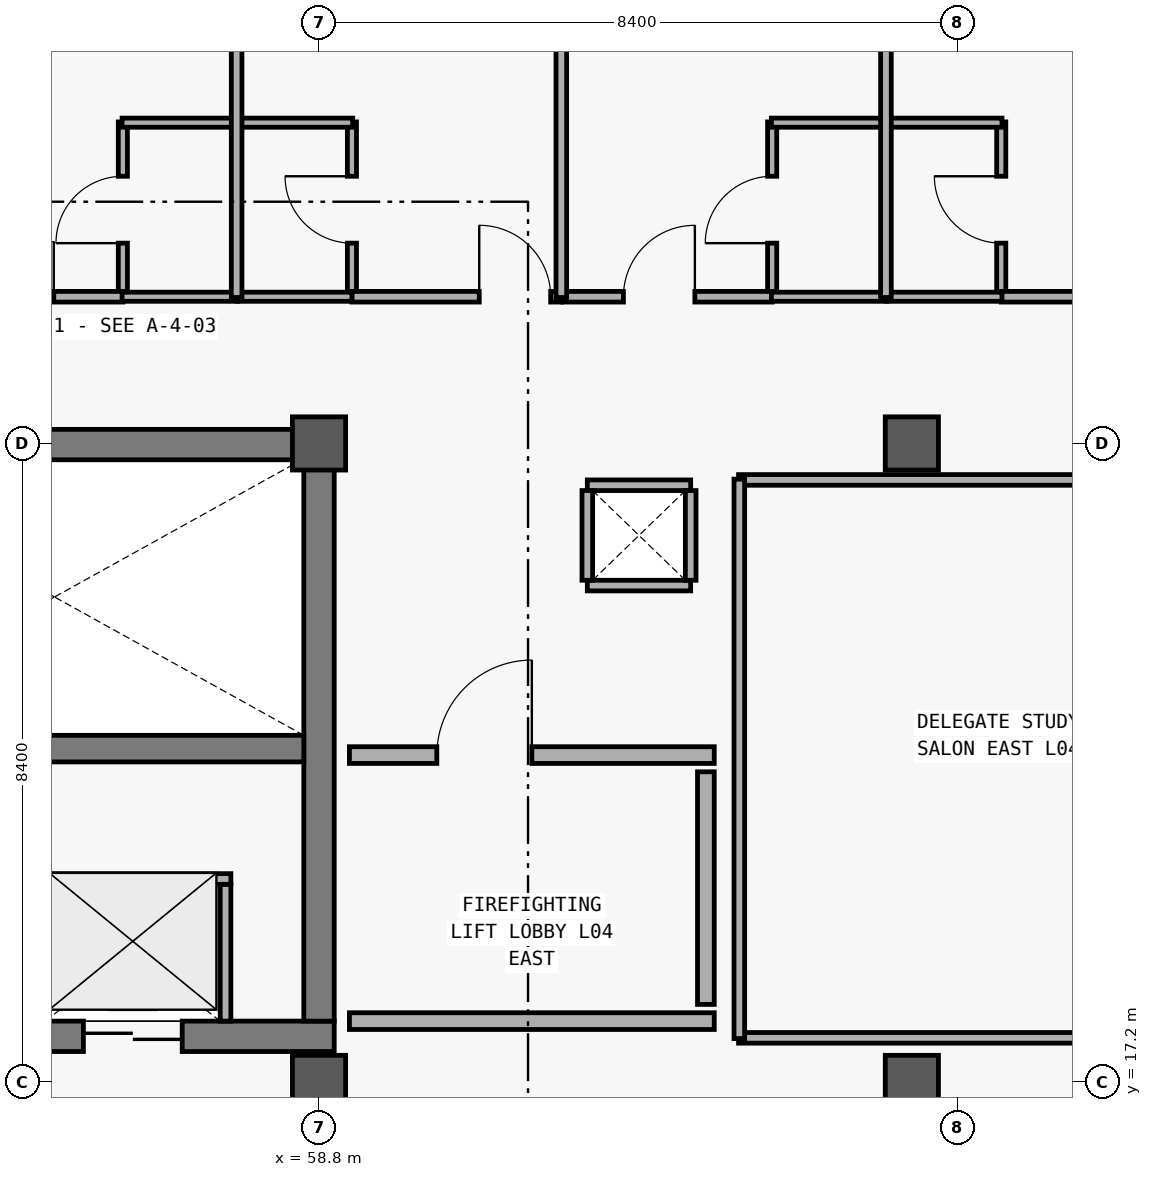
"""IFC4 building model, lengths in metres.
Left out: names, types, materials, properties, quantities, classifications, styles, units other than length and angle.
Written with IfcOpenShell. Run it as: python <this file> out.ifc"""

import sys

from ifc_helpers import new_model, si_unit, direction, frame, frame_2d, origin, origin_2d, place, context, subcontext, project, spatial, rectangle, extrude, element, fill, save


model = new_model("IFC4")
c1 = context("Model", 3, precision=1e-05, world=origin(), true_north=direction((0.0, 1.0)))
c2 = subcontext(c1, "Body", "Model", "MODEL_VIEW")
j1 = project(units=[si_unit("LENGTHUNIT", "METRE"), si_unit("PLANEANGLEUNIT", "RADIAN")], contexts=[c1])
p1 = place(None, origin())
s1 = spatial("IfcSite", under=j1, at=p1, CompositionType="ELEMENT")
p2 = place(p1, origin())
s2 = spatial("IfcBuilding", under=s1, at=p2, CompositionType="ELEMENT")
p3 = place(p2, frame((0.0, 0.0, 19.2)))
s3 = spatial("IfcBuildingStorey", under=s2, at=p3, CompositionType="ELEMENT", Elevation=19.2)
for number, where, z_axis, x_axis in (
    (1, (58.8, 17.2, 0.0), (0.0, 0.0, 1.0), (1.0, 0.0, 0.0)),
    (2, (58.8, 25.6, 0.0), (0.0, 0.0, 1.0), (1.0, 0.0, 0.0)),
    (3, (66.6, 17.2, 0.0), (0.0, 0.0, 1.0), (1.0, 0.0, 0.0)),
    (4, (66.6, 25.6, 0.0), (0.0, 0.0, 1.0), (1.0, 0.0, 0.0)),
):
    element("IfcColumn", number, at=place(p3, frame(where, z_axis=z_axis, x_axis=x_axis)), inside=s3, PredefinedType="COLUMN", context=c2, shape_type="SweptSolid", body=[
        extrude(rectangle(XDim=0.7, YDim=0.7, at=origin_2d()), origin(), (0.0, 0.0, 1.0), 3.6),
    ])
p4 = place(p3, frame((49.8, 17.8, 0.0), z_axis=(0.0, 0.0, 1.0), x_axis=(1.0, 0.0, 0.0)))
e5 = element("IfcWall", 5, at=p4, inside=s3, PredefinedType="SHEAR", context=c2, shape_type="SweptSolid", body=[
    extrude(rectangle(XDim=9.2, YDim=0.4, at=frame_2d((4.6, 0.0))), origin(), (0.0, 0.0, 1.0), 3.32),
])
p5 = place(p4, frame((1.1, 0.0, 0.0)))
e6 = element("IfcOpeningElement", 6, at=p5, cuts=e5, PredefinedType="OPENING", context=c2, shape_type="SweptSolid", body=[
    extrude(rectangle(XDim=1.2, YDim=2.2, at=frame_2d((0.6, 1.1))), frame((0.0, 0.21, 0.0), z_axis=(0.0, -1.0, 0.0), x_axis=(1.0, 0.0, 0.0)), (0.0, 0.0, 1.0), 0.42),
])
p6 = place(p4, frame((3.5, 0.0, 0.0)))
e7 = element("IfcOpeningElement", 7, at=p6, cuts=e5, PredefinedType="OPENING", context=c2, shape_type="SweptSolid", body=[
    extrude(rectangle(XDim=1.1, YDim=2.2, at=frame_2d((0.55, 1.1))), frame((0.0, 0.21, 0.0), z_axis=(0.0, -1.0, 0.0), x_axis=(1.0, 0.0, 0.0)), (0.0, 0.0, 1.0), 0.42),
])
p7 = place(p4, frame((5.9, 0.0, 0.0)))
e8 = element("IfcOpeningElement", 8, at=p7, cuts=e5, PredefinedType="OPENING", context=c2, shape_type="SweptSolid", body=[
    extrude(rectangle(XDim=1.3, YDim=2.3, at=frame_2d((0.65, 1.15))), frame((0.0, 0.21, 0.0), z_axis=(0.0, -1.0, 0.0), x_axis=(1.0, 0.0, 0.0)), (0.0, 0.0, 1.0), 0.42),
])
p8 = place(p3, frame((59.0, 25.585, 0.0), z_axis=(0.0, 0.0, 1.0), x_axis=(-1.0, 0.0, 0.0)))
e9 = element("IfcWall", 9, at=p8, inside=s3, PredefinedType="SHEAR", context=c2, shape_type="SweptSolid", body=[
    extrude(rectangle(XDim=9.2, YDim=0.4, at=frame_2d((4.6, 0.0))), origin(), (0.0, 0.0, 1.0), 3.32),
])
p9 = place(p3, frame((58.8, 18.0, 0.0), z_axis=(0.0, 0.0, 1.0), x_axis=(0.0, 1.0, 0.0)))
e10 = element("IfcWall", 10, at=p9, inside=s3, PredefinedType="SHEAR", context=c2, shape_type="SweptSolid", body=[
    extrude(rectangle(XDim=7.4, YDim=0.4, at=frame_2d((3.7, 0.0))), origin(), (0.0, 0.0, 1.0), 3.32),
])
p10 = place(p3, frame((50.2, 21.585, 0.0), z_axis=(0.0, 0.0, 1.0), x_axis=(1.0, 0.0, 0.0)))
e11 = element("IfcWall", 11, at=p10, inside=s3, PredefinedType="SHEAR", context=c2, shape_type="SweptSolid", body=[
    extrude(rectangle(XDim=8.4, YDim=0.35, at=frame_2d((4.2, 0.0))), origin(), (0.0, 0.0, 1.0), 3.32),
])
p11 = place(p3, frame((57.57, 18.0, 0.0), z_axis=(0.0, 0.0, 1.0), x_axis=(0.0, 1.0, 0.0)))
e12 = element("IfcWall", 12, at=p11, inside=s3, PredefinedType="PARTITIONING", context=c2, shape_type="SweptSolid", body=[
    extrude(rectangle(XDim=1.8, YDim=0.14, at=frame_2d((0.9, 0.0))), origin(), (0.0, 0.0, 1.0), 2.47),
])
p12 = place(p3, frame((50.26, 19.87, 0.0), z_axis=(0.0, 0.0, 1.0), x_axis=(1.0, 0.0, 0.0)))
e13 = element("IfcWall", 13, at=p12, inside=s3, PredefinedType="PARTITIONING", context=c2, shape_type="SweptSolid", body=[
    extrude(rectangle(XDim=7.38, YDim=0.14, at=frame_2d((3.69, 0.0))), origin(), (0.0, 0.0, 1.0), 2.47),
])
p13 = place(p3, frame((59.2, 18.0, 0.0), z_axis=(0.0, 0.0, 1.0), x_axis=(1.0, 0.0, 0.0)))
e14 = element("IfcWall", 14, at=p13, inside=s3, PredefinedType="SOLIDWALL", context=c2, shape_type="SweptSolid", body=[
    extrude(rectangle(XDim=4.8, YDim=0.22, at=frame_2d((2.4, 0.0))), origin(), (0.0, 0.0, 1.0), 2.47),
])
p14 = place(p3, frame((59.2, 21.5, 0.0), z_axis=(0.0, 0.0, 1.0), x_axis=(1.0, 0.0, 0.0)))
e15 = element("IfcWall", 15, at=p14, inside=s3, PredefinedType="SOLIDWALL", context=c2, shape_type="SweptSolid", body=[
    extrude(rectangle(XDim=4.8, YDim=0.22, at=frame_2d((2.4, 0.0))), origin(), (0.0, 0.0, 1.0), 2.47),
])
p15 = place(p14, frame((1.15, 0.0, 0.0)))
e16 = element("IfcOpeningElement", 16, at=p15, cuts=e15, PredefinedType="OPENING", context=c2, shape_type="SweptSolid", body=[
    extrude(rectangle(XDim=1.25, YDim=2.2, at=frame_2d((0.625, 1.1))), frame((0.0, 0.12, 0.0), z_axis=(0.0, -1.0, 0.0), x_axis=(1.0, 0.0, 0.0)), (0.0, 0.0, 1.0), 0.24),
])
p16 = place(p3, frame((63.89, 18.22, 0.0), z_axis=(0.0, 0.0, 1.0), x_axis=(0.0, 1.0, 0.0)))
e17 = element("IfcWall", 17, at=p16, inside=s3, PredefinedType="SOLIDWALL", context=c2, shape_type="SweptSolid", body=[
    extrude(rectangle(XDim=3.06, YDim=0.22, at=frame_2d((1.53, 0.0))), origin(), (0.0, 0.0, 1.0), 2.47),
])
p17 = place(p3, frame((56.219, 27.52, 0.0), z_axis=(0.0, 0.0, 1.0), x_axis=(0.0, 1.0, 0.0)))
e18 = element("IfcWall", 18, at=p17, inside=s3, PredefinedType="PARTITIONING", context=c2, shape_type="SweptSolid", body=[
    extrude(rectangle(XDim=2.31, YDim=0.12, at=frame_2d((1.155, 0.0))), origin(), (0.0, 0.0, 1.0), 2.48),
])
p18 = place(p17, frame((0.715, 0.0, 0.0)))
e19 = element("IfcOpeningElement", 19, at=p18, cuts=e18, PredefinedType="OPENING", context=c2, shape_type="SweptSolid", body=[
    extrude(rectangle(XDim=0.88, YDim=2.15, at=frame_2d((0.44, 1.075))), frame((0.0, 0.07, 0.0), z_axis=(0.0, -1.0, 0.0), x_axis=(1.0, 0.0, 0.0)), (0.0, 0.0, 1.0), 0.14),
])
p19 = place(p3, frame((59.233, 27.52, 0.0), z_axis=(0.0, 0.0, 1.0), x_axis=(0.0, 1.0, 0.0)))
e20 = element("IfcWall", 20, at=p19, inside=s3, PredefinedType="PARTITIONING", context=c2, shape_type="SweptSolid", body=[
    extrude(rectangle(XDim=2.31, YDim=0.12, at=frame_2d((1.155, 0.0))), origin(), (0.0, 0.0, 1.0), 2.48),
])
p20 = place(p19, frame((0.715, 0.0, 0.0)))
e21 = element("IfcOpeningElement", 21, at=p20, cuts=e20, PredefinedType="OPENING", context=c2, shape_type="SweptSolid", body=[
    extrude(rectangle(XDim=0.88, YDim=2.15, at=frame_2d((0.44, 1.075))), frame((0.0, 0.07, 0.0), z_axis=(0.0, -1.0, 0.0), x_axis=(1.0, 0.0, 0.0)), (0.0, 0.0, 1.0), 0.14),
])
p21 = place(p3, frame((64.762, 27.52, 0.0), z_axis=(0.0, 0.0, 1.0), x_axis=(0.0, 1.0, 0.0)))
e22 = element("IfcWall", 22, at=p21, inside=s3, PredefinedType="PARTITIONING", context=c2, shape_type="SweptSolid", body=[
    extrude(rectangle(XDim=2.31, YDim=0.12, at=frame_2d((1.155, 0.0))), origin(), (0.0, 0.0, 1.0), 2.48),
])
p22 = place(p21, frame((0.715, 0.0, 0.0)))
e23 = element("IfcOpeningElement", 23, at=p22, cuts=e22, PredefinedType="OPENING", context=c2, shape_type="SweptSolid", body=[
    extrude(rectangle(XDim=0.88, YDim=2.15, at=frame_2d((0.44, 1.075))), frame((0.0, 0.07, 0.0), z_axis=(0.0, -1.0, 0.0), x_axis=(1.0, 0.0, 0.0)), (0.0, 0.0, 1.0), 0.14),
])
p23 = place(p3, frame((67.776, 27.52, 0.0), z_axis=(0.0, 0.0, 1.0), x_axis=(0.0, 1.0, 0.0)))
e24 = element("IfcWall", 24, at=p23, inside=s3, PredefinedType="PARTITIONING", context=c2, shape_type="SweptSolid", body=[
    extrude(rectangle(XDim=2.31, YDim=0.12, at=frame_2d((1.155, 0.0))), origin(), (0.0, 0.0, 1.0), 2.48),
])
p24 = place(p23, frame((0.715, 0.0, 0.0)))
e25 = element("IfcOpeningElement", 25, at=p24, cuts=e24, PredefinedType="OPENING", context=c2, shape_type="SweptSolid", body=[
    extrude(rectangle(XDim=0.88, YDim=2.15, at=frame_2d((0.44, 1.075))), frame((0.0, 0.07, 0.0), z_axis=(0.0, -1.0, 0.0), x_axis=(1.0, 0.0, 0.0)), (0.0, 0.0, 1.0), 0.14),
])
p25 = place(p3, frame((64.32, 17.78, 0.0), z_axis=(0.0, 0.0, 1.0), x_axis=(1.0, 0.0, 0.0)))
e26 = element("IfcWall", 26, at=p25, inside=s3, PredefinedType="PARTITIONING", context=c2, shape_type="SweptSolid", body=[
    extrude(rectangle(XDim=27.8, YDim=0.14, at=frame_2d((13.9, 0.0))), origin(), (0.0, 0.0, 1.0), 2.48),
])
p26 = place(p25, frame((5.958, 0.0, 0.0)))
e27 = element("IfcOpeningElement", 27, at=p26, cuts=e26, PredefinedType="OPENING", context=c2, shape_type="SweptSolid", body=[
    extrude(rectangle(XDim=1.08, YDim=2.25, at=frame_2d((0.54, 1.125))), frame((0.0, 0.08, 0.0), z_axis=(0.0, -1.0, 0.0), x_axis=(1.0, 0.0, 0.0)), (0.0, 0.0, 1.0), 0.16),
])
p27 = place(p3, frame((53.464, 27.53, 0.0), z_axis=(0.0, 0.0, 1.0), x_axis=(1.0, 0.0, 0.0)))
e28 = element("IfcWall", 28, at=p27, inside=s3, PredefinedType="PARTITIONING", context=c2, shape_type="SweptSolid", body=[
    extrude(rectangle(XDim=2.755, YDim=0.14, at=frame_2d((1.377, 0.0))), origin(), (0.0, 0.0, 1.0), 2.48),
])
p28 = place(p27, frame((0.396, 0.0, 0.0)))
e29 = element("IfcOpeningElement", 29, at=p28, cuts=e28, PredefinedType="OPENING", context=c2, shape_type="SweptSolid", body=[
    extrude(rectangle(XDim=1.45, YDim=2.3, at=frame_2d((0.725, 1.15))), frame((0.0, 0.08, 0.0), z_axis=(0.0, -1.0, 0.0), x_axis=(1.0, 0.0, 0.0)), (0.0, 0.0, 1.0), 0.16),
])
p29 = place(p3, frame((59.233, 27.53, 0.0), z_axis=(0.0, 0.0, 1.0), x_axis=(1.0, 0.0, 0.0)))
e30 = element("IfcWall", 30, at=p29, inside=s3, PredefinedType="PARTITIONING", context=c2, shape_type="SweptSolid", body=[
    extrude(rectangle(XDim=2.755, YDim=0.14, at=frame_2d((1.377, 0.0))), origin(), (0.0, 0.0, 1.0), 2.48),
])
p30 = place(p29, frame((1.675, 0.0, 0.0)))
e31 = element("IfcOpeningElement", 31, at=p30, cuts=e30, PredefinedType="OPENING", context=c2, shape_type="SweptSolid", body=[
    extrude(rectangle(XDim=0.94, YDim=2.2, at=frame_2d((0.47, 1.1))), frame((0.0, 0.08, 0.0), z_axis=(0.0, -1.0, 0.0), x_axis=(1.0, 0.0, 0.0)), (0.0, 0.0, 1.0), 0.16),
])
p31 = place(p3, frame((62.008, 27.53, 0.0), z_axis=(0.0, 0.0, 1.0), x_axis=(1.0, 0.0, 0.0)))
e32 = element("IfcWall", 32, at=p31, inside=s3, PredefinedType="PARTITIONING", context=c2, shape_type="SweptSolid", body=[
    extrude(rectangle(XDim=2.754, YDim=0.14, at=frame_2d((1.377, 0.0))), origin(), (0.0, 0.0, 1.0), 2.48),
])
p32 = place(p31, frame((0.797, 0.0, 0.0)))
e33 = element("IfcOpeningElement", 33, at=p32, cuts=e32, PredefinedType="OPENING", context=c2, shape_type="SweptSolid", body=[
    extrude(rectangle(XDim=0.94, YDim=2.2, at=frame_2d((0.47, 1.1))), frame((0.0, 0.08, 0.0), z_axis=(0.0, -1.0, 0.0), x_axis=(1.0, 0.0, 0.0)), (0.0, 0.0, 1.0), 0.16),
])
p33 = place(p3, frame((67.776, 27.53, 0.0), z_axis=(0.0, 0.0, 1.0), x_axis=(1.0, 0.0, 0.0)))
e34 = element("IfcWall", 34, at=p33, inside=s3, PredefinedType="PARTITIONING", context=c2, shape_type="SweptSolid", body=[
    extrude(rectangle(XDim=2.755, YDim=0.14, at=frame_2d((1.377, 0.0))), origin(), (0.0, 0.0, 1.0), 2.48),
])
p34 = place(p33, frame((1.675, 0.0, 0.0)))
e35 = element("IfcOpeningElement", 35, at=p34, cuts=e34, PredefinedType="OPENING", context=c2, shape_type="SweptSolid", body=[
    extrude(rectangle(XDim=0.94, YDim=2.2, at=frame_2d((0.47, 1.1))), frame((0.0, 0.08, 0.0), z_axis=(0.0, -1.0, 0.0), x_axis=(1.0, 0.0, 0.0)), (0.0, 0.0, 1.0), 0.16),
])
for number, where, z_axis, x_axis in (
    (36, (56.209, 27.53, 0.0), (0.0, 0.0, 1.0), (1.0, 0.0, 0.0)),
    (37, (56.209, 29.82, 0.0), (0.0, 0.0, 1.0), (1.0, 0.0, 0.0)),
):
    element("IfcWall", number, at=place(p3, frame(where, z_axis=z_axis, x_axis=x_axis)), inside=s3, PredefinedType="PARTITIONING", context=c2, shape_type="SweptSolid", body=[
        extrude(rectangle(XDim=1.517, YDim=0.12, at=frame_2d((0.759, 0.0))), origin(), (0.0, 0.0, 1.0), 2.48),
    ])
p35 = place(p3, frame((57.726, 27.53, 0.0), z_axis=(0.0, 0.0, 1.0), x_axis=(1.0, 0.0, 0.0)))
e38 = element("IfcWall", 38, at=p35, inside=s3, PredefinedType="PARTITIONING", context=c2, shape_type="SweptSolid", body=[
    extrude(rectangle(XDim=1.507, YDim=0.12, at=frame_2d((0.753, 0.0))), origin(), (0.0, 0.0, 1.0), 2.48),
])
p36 = place(p3, frame((57.726, 29.82, 0.0), z_axis=(0.0, 0.0, 1.0), x_axis=(1.0, 0.0, 0.0)))
e39 = element("IfcWall", 39, at=p36, inside=s3, PredefinedType="PARTITIONING", context=c2, shape_type="SweptSolid", body=[
    extrude(rectangle(XDim=1.517, YDim=0.12, at=frame_2d((0.758, 0.0))), origin(), (0.0, 0.0, 1.0), 2.48),
])
for number, where, z_axis, x_axis in (
    (40, (64.752, 27.53, 0.0), (0.0, 0.0, 1.0), (1.0, 0.0, 0.0)),
    (41, (64.752, 29.82, 0.0), (0.0, 0.0, 1.0), (1.0, 0.0, 0.0)),
):
    element("IfcWall", number, at=place(p3, frame(where, z_axis=z_axis, x_axis=x_axis)), inside=s3, PredefinedType="PARTITIONING", context=c2, shape_type="SweptSolid", body=[
        extrude(rectangle(XDim=1.517, YDim=0.12, at=frame_2d((0.759, 0.0))), origin(), (0.0, 0.0, 1.0), 2.48),
    ])
for number, where, z_axis, x_axis in (
    (42, (66.269, 27.53, 0.0), (0.0, 0.0, 1.0), (1.0, 0.0, 0.0)),
    (43, (66.269, 29.82, 0.0), (0.0, 0.0, 1.0), (1.0, 0.0, 0.0)),
):
    element("IfcWall", number, at=place(p3, frame(where, z_axis=z_axis, x_axis=x_axis)), inside=s3, PredefinedType="PARTITIONING", context=c2, shape_type="SweptSolid", body=[
        extrude(rectangle(XDim=1.517, YDim=0.12, at=frame_2d((0.758, 0.0))), origin(), (0.0, 0.0, 1.0), 2.48),
    ])
p37 = place(p3, frame((64.32, 25.12, 0.0), z_axis=(0.0, 0.0, 1.0), x_axis=(1.0, 0.0, 0.0)))
e44 = element("IfcWall", 44, at=p37, inside=s3, PredefinedType="PARTITIONING", context=c2, shape_type="SweptSolid", body=[
    extrude(rectangle(XDim=27.8, YDim=0.14, at=frame_2d((13.9, 0.0))), origin(), (0.0, 0.0, 1.0), 2.48),
])
p38 = place(p3, frame((64.33, 17.77, 0.0), z_axis=(0.0, 0.0, 1.0), x_axis=(0.0, 1.0, 0.0)))
e45 = element("IfcWall", 45, at=p38, inside=s3, PredefinedType="PARTITIONING", context=c2, shape_type="SweptSolid", body=[
    extrude(rectangle(XDim=7.36, YDim=0.14, at=frame_2d((3.68, 0.0))), origin(), (0.0, 0.0, 1.0), 2.48),
])
for number, where, z_axis, x_axis in (
    (46, (57.716, 27.52, 0.0), (0.0, 0.0, 1.0), (0.0, 1.0, 0.0)),
    (47, (61.988, 27.52, 0.0), (0.0, 0.0, 1.0), (0.0, 1.0, 0.0)),
    (48, (66.259, 27.52, 0.0), (0.0, 0.0, 1.0), (0.0, 1.0, 0.0)),
):
    element("IfcWall", number, at=place(p3, frame(where, z_axis=z_axis, x_axis=x_axis)), inside=s3, PredefinedType="PARTITIONING", context=c2, shape_type="SweptSolid", body=[
        extrude(rectangle(XDim=6.2, YDim=0.14, at=frame_2d((3.1, 0.0))), origin(), (0.0, 0.0, 1.0), 2.48),
    ])
for number, where, z_axis, x_axis in (
    (49, (62.33, 23.73, 0.0), (0.0, 0.0, 1.0), (1.0, 0.0, 0.0)),
    (50, (63.69, 25.05, 0.0), (0.0, 0.0, 1.0), (-1.0, 0.0, 0.0)),
):
    element("IfcWall", number, at=place(p3, frame(where, z_axis=z_axis, x_axis=x_axis)), inside=s3, PredefinedType="PARTITIONING", context=c2, shape_type="SweptSolid", body=[
        extrude(rectangle(XDim=1.36, YDim=0.14, at=frame_2d((0.68, 0.0))), origin(), (0.0, 0.0, 1.0), 2.44),
    ])
for number, where, z_axis, x_axis in (
    (51, (62.33, 24.98, 0.0), (0.0, 0.0, 1.0), (0.0, -1.0, 0.0)),
    (52, (63.69, 23.8, 0.0), (0.0, 0.0, 1.0), (0.0, 1.0, 0.0)),
):
    element("IfcWall", number, at=place(p3, frame(where, z_axis=z_axis, x_axis=x_axis)), inside=s3, PredefinedType="PARTITIONING", context=c2, shape_type="SweptSolid", body=[
        extrude(rectangle(XDim=1.18, YDim=0.14, at=frame_2d((0.59, 0.0))), origin(), (0.0, 0.0, 1.0), 2.44),
    ])
p39 = place(p7, origin())
e53 = element("IfcDoor", 53, at=p39, inside=s3, OperationType="DOUBLE_DOOR_SLIDING", PredefinedType="DOOR", context=c2, shape_type="SweptSolid", body=[
    extrude(rectangle(XDim=1.3, YDim=2.3, at=frame_2d((0.65, 1.15))), frame((0.0, 0.025, 0.0), z_axis=(0.0, -1.0, 0.0), x_axis=(1.0, 0.0, 0.0)), (0.0, 0.0, 1.0), 0.05),
])
fill(e8, e53)
p40 = place(p15, origin())
e54 = element("IfcDoor", 54, at=p40, inside=s3, OperationType="SINGLE_SWING_RIGHT", PredefinedType="DOOR", context=c2, shape_type="SweptSolid", body=[
    extrude(rectangle(XDim=1.25, YDim=2.2, at=frame_2d((0.625, 1.1))), frame((0.0, 0.025, 0.0), z_axis=(0.0, -1.0, 0.0), x_axis=(1.0, 0.0, 0.0)), (0.0, 0.0, 1.0), 0.05),
])
fill(e16, e54)
p41 = place(p18, origin())
e55 = element("IfcDoor", 55, at=p41, inside=s3, OperationType="SINGLE_SWING_LEFT", PredefinedType="DOOR", context=c2, shape_type="SweptSolid", body=[
    extrude(rectangle(XDim=0.88, YDim=2.15, at=frame_2d((0.44, 1.075))), frame((0.0, 0.025, 0.0), z_axis=(0.0, -1.0, 0.0), x_axis=(1.0, 0.0, 0.0)), (0.0, 0.0, 1.0), 0.05),
])
fill(e19, e55)
p42 = place(p20, origin())
e56 = element("IfcDoor", 56, at=p42, inside=s3, OperationType="SINGLE_SWING_RIGHT", PredefinedType="DOOR", context=c2, shape_type="SweptSolid", body=[
    extrude(rectangle(XDim=0.88, YDim=2.15, at=frame_2d((0.44, 1.075))), frame((0.0, 0.025, 0.0), z_axis=(0.0, -1.0, 0.0), x_axis=(1.0, 0.0, 0.0)), (0.0, 0.0, 1.0), 0.05),
])
fill(e21, e56)
p43 = place(p22, origin())
e57 = element("IfcDoor", 57, at=p43, inside=s3, OperationType="SINGLE_SWING_LEFT", PredefinedType="DOOR", context=c2, shape_type="SweptSolid", body=[
    extrude(rectangle(XDim=0.88, YDim=2.15, at=frame_2d((0.44, 1.075))), frame((0.0, 0.025, 0.0), z_axis=(0.0, -1.0, 0.0), x_axis=(1.0, 0.0, 0.0)), (0.0, 0.0, 1.0), 0.05),
])
fill(e23, e57)
p44 = place(p24, origin())
e58 = element("IfcDoor", 58, at=p44, inside=s3, OperationType="SINGLE_SWING_RIGHT", PredefinedType="DOOR", context=c2, shape_type="SweptSolid", body=[
    extrude(rectangle(XDim=0.88, YDim=2.15, at=frame_2d((0.44, 1.075))), frame((0.0, 0.025, 0.0), z_axis=(0.0, -1.0, 0.0), x_axis=(1.0, 0.0, 0.0)), (0.0, 0.0, 1.0), 0.05),
])
fill(e25, e58)
p45 = place(p28, origin())
e59 = element("IfcDoor", 59, at=p45, inside=s3, OperationType="DOUBLE_DOOR_SINGLE_SWING", PredefinedType="DOOR", context=c2, shape_type="SweptSolid", body=[
    extrude(rectangle(XDim=1.45, YDim=2.3, at=frame_2d((0.725, 1.15))), frame((0.0, 0.025, 0.0), z_axis=(0.0, -1.0, 0.0), x_axis=(1.0, 0.0, 0.0)), (0.0, 0.0, 1.0), 0.05),
])
fill(e29, e59)
p46 = place(p30, origin())
e60 = element("IfcDoor", 60, at=p46, inside=s3, OperationType="SINGLE_SWING_LEFT", PredefinedType="DOOR", context=c2, shape_type="SweptSolid", body=[
    extrude(rectangle(XDim=0.94, YDim=2.2, at=frame_2d((0.47, 1.1))), frame((0.0, 0.025, 0.0), z_axis=(0.0, -1.0, 0.0), x_axis=(1.0, 0.0, 0.0)), (0.0, 0.0, 1.0), 0.05),
])
fill(e31, e60)
p47 = place(p32, origin())
e61 = element("IfcDoor", 61, at=p47, inside=s3, OperationType="SINGLE_SWING_RIGHT", PredefinedType="DOOR", context=c2, shape_type="SweptSolid", body=[
    extrude(rectangle(XDim=0.94, YDim=2.2, at=frame_2d((0.47, 1.1))), frame((0.0, 0.025, 0.0), z_axis=(0.0, -1.0, 0.0), x_axis=(1.0, 0.0, 0.0)), (0.0, 0.0, 1.0), 0.05),
])
fill(e33, e61)
save(model, sys.argv[1])
